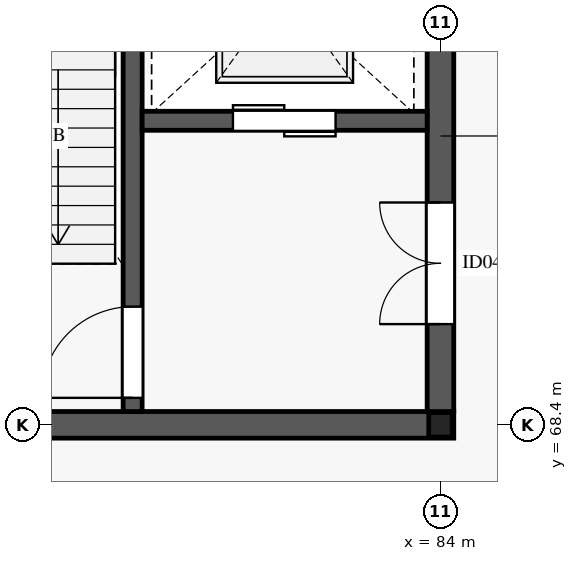
"""IFC4 building model, lengths in metres.
Left out: names, types, materials, properties, quantities, classifications, styles, units other than length and angle.
Written with IfcOpenShell. Run it as: python <this file> out.ifc"""

import sys

from ifc_helpers import new_model, si_unit, direction, frame, frame_2d, origin, origin_2d, place, context, subcontext, project, spatial, rectangle, i_section, extrude, element, fill, save


model = new_model("IFC4")
c1 = context("Model", 3, precision=1e-05, world=origin(), true_north=direction((0.0, 1.0)))
c2 = subcontext(c1, "Body", "Model", "MODEL_VIEW")
j1 = project(units=[si_unit("LENGTHUNIT", "METRE"), si_unit("PLANEANGLEUNIT", "RADIAN")], contexts=[c1])
p1 = place(None, origin())
s1 = spatial("IfcSite", under=j1, at=p1, CompositionType="ELEMENT")
p2 = place(p1, origin())
s2 = spatial("IfcBuilding", under=s1, at=p2, CompositionType="ELEMENT")
p3 = place(p2, frame((0.0, 0.0, 29.4)))
s3 = spatial("IfcBuildingStorey", under=s2, at=p3, CompositionType="ELEMENT", Elevation=29.4)
p4 = place(p3, frame((84.0, 68.4, 0.0), z_axis=(0.0, 0.0, 1.0), x_axis=(1.0, 0.0, 0.0)))
e1 = element("IfcColumn", 1, at=p4, inside=s3, PredefinedType="COLUMN", context=c2, shape_type="SweptSolid", body=[
    extrude(i_section(OverallWidth=0.309, OverallDepth=0.323, WebThickness=0.014, FlangeThickness=0.023, FilletRadius=0.015, at=origin_2d()), origin(), (0.0, 0.0, 1.0), 4.0),
])
p5 = place(p3, frame((75.825, 68.4, 0.0), z_axis=(0.0, 0.0, 1.0), x_axis=(1.0, 0.0, 0.0)))
e2 = element("IfcWall", 2, at=p5, inside=s3, PredefinedType="SHEAR", context=c2, shape_type="SweptSolid", body=[
    extrude(rectangle(XDim=8.35, YDim=0.35, at=frame_2d((4.175, 0.0))), origin(), (0.0, 0.0, 1.0), 3.99),
])
p6 = place(p3, frame((84.0, 68.575, 0.0), z_axis=(0.0, 0.0, 1.0), x_axis=(0.0, 1.0, 0.0)))
e3 = element("IfcWall", 3, at=p6, inside=s3, PredefinedType="SHEAR", context=c2, shape_type="SweptSolid", body=[
    extrude(rectangle(XDim=7.25, YDim=0.35, at=frame_2d((3.625, 0.0))), origin(), (0.0, 0.0, 1.0), 3.99),
])
p7 = place(p6, frame((1.15, 0.0, 0.0)))
e4 = element("IfcOpeningElement", 4, at=p7, cuts=e3, PredefinedType="OPENING", context=c2, shape_type="SweptSolid", body=[
    extrude(rectangle(XDim=1.6, YDim=2.35, at=frame_2d((0.8, 1.175))), frame((0.0, 0.185, 0.0), z_axis=(0.0, -1.0, 0.0), x_axis=(1.0, 0.0, 0.0)), (0.0, 0.0, 1.0), 0.37),
])
p8 = place(p3, frame((79.95, 68.575, 0.0), z_axis=(0.0, 0.0, 1.0), x_axis=(0.0, 1.0, 0.0)))
e5 = element("IfcWall", 5, at=p8, inside=s3, PredefinedType="SHEAR", context=c2, shape_type="SweptSolid", body=[
    extrude(rectangle(XDim=7.25, YDim=0.25, at=frame_2d((3.625, 0.0))), origin(), (0.0, 0.0, 1.0), 3.99),
])
p9 = place(p8, frame((0.18, 0.0, 0.0)))
e6 = element("IfcOpeningElement", 6, at=p9, cuts=e5, PredefinedType="OPENING", context=c2, shape_type="SweptSolid", body=[
    extrude(rectangle(XDim=1.2, YDim=2.2, at=frame_2d((0.6, 1.1))), frame((0.0, 0.135, 0.0), z_axis=(0.0, -1.0, 0.0), x_axis=(1.0, 0.0, 0.0)), (0.0, 0.0, 1.0), 0.27),
])
p10 = place(p3, frame((80.075, 72.4, 0.0), z_axis=(0.0, 0.0, 1.0), x_axis=(1.0, 0.0, 0.0)))
e7 = element("IfcWall", 7, at=p10, inside=s3, PredefinedType="SHEAR", context=c2, shape_type="SweptSolid", body=[
    extrude(rectangle(XDim=3.75, YDim=0.25, at=frame_2d((1.875, 0.0))), origin(), (0.0, 0.0, 1.0), 3.99),
])
p11 = place(p10, frame((1.195, 0.0, 0.0)))
e8 = element("IfcOpeningElement", 8, at=p11, cuts=e7, PredefinedType="OPENING", context=c2, shape_type="SweptSolid", body=[
    extrude(rectangle(XDim=1.35, YDim=2.2, at=frame_2d((0.675, 1.1))), frame((0.0, 0.135, 0.0), z_axis=(0.0, -1.0, 0.0), x_axis=(1.0, 0.0, 0.0)), (0.0, 0.0, 1.0), 0.27),
])
p12 = place(p9, origin())
e9 = element("IfcDoor", 9, at=p12, inside=s3, OperationType="SINGLE_SWING_LEFT", PredefinedType="DOOR", context=c2, shape_type="SweptSolid", body=[
    extrude(rectangle(XDim=1.2, YDim=2.2, at=frame_2d((0.6, 1.1))), frame((0.0, 0.025, 0.0), z_axis=(0.0, -1.0, 0.0), x_axis=(1.0, 0.0, 0.0)), (0.0, 0.0, 1.0), 0.05),
])
fill(e6, e9)
p13 = place(p7, origin())
e10 = element("IfcDoor", 10, at=p13, inside=s3, OperationType="DOUBLE_DOOR_SINGLE_SWING", PredefinedType="DOOR", context=c2, shape_type="SweptSolid", body=[
    extrude(rectangle(XDim=1.6, YDim=2.35, at=frame_2d((0.8, 1.175))), frame((0.0, 0.025, 0.0), z_axis=(0.0, -1.0, 0.0), x_axis=(1.0, 0.0, 0.0)), (0.0, 0.0, 1.0), 0.05),
])
fill(e4, e10)
p14 = place(p11, origin())
e11 = element("IfcDoor", 11, at=p14, inside=s3, OperationType="DOUBLE_DOOR_SLIDING", PredefinedType="DOOR", context=c2, shape_type="SweptSolid", body=[
    extrude(rectangle(XDim=1.35, YDim=2.2, at=frame_2d((0.675, 1.1))), frame((0.0, 0.025, 0.0), z_axis=(0.0, -1.0, 0.0), x_axis=(1.0, 0.0, 0.0)), (0.0, 0.0, 1.0), 0.05),
])
fill(e8, e11)
save(model, sys.argv[1])
